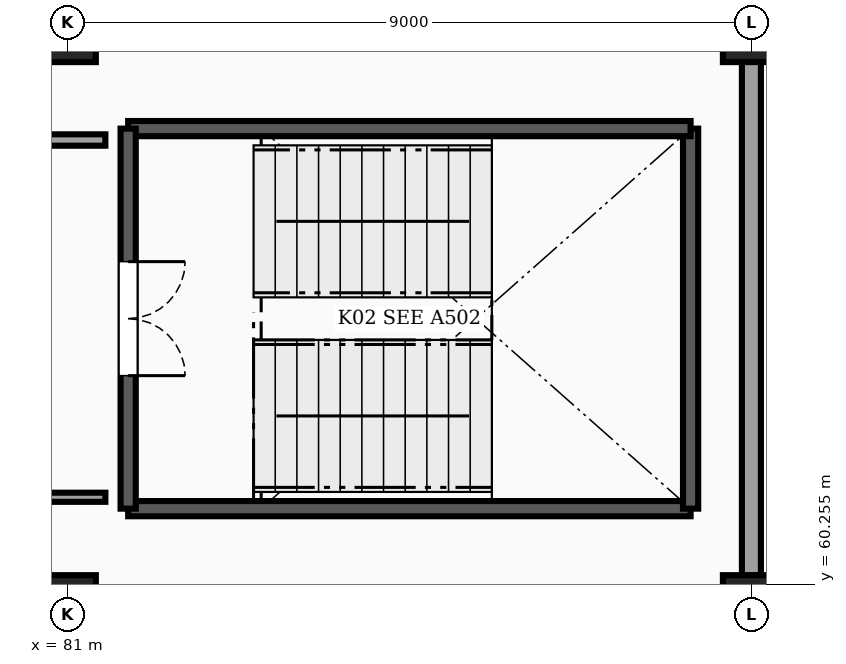
"""IFC4 building model, lengths in metres.
Left out: names, types, materials, properties, quantities, classifications, styles, units other than length and angle.
Written with IfcOpenShell. Run it as: python <this file> out.ifc"""

import sys

from ifc_helpers import new_model, si_unit, direction, frame, frame_2d, origin, origin_2d, place, context, subcontext, project, spatial, rectangle, extrude, element, fill, save


model = new_model("IFC4")
c1 = context("Model", 3, precision=1e-05, world=origin(), true_north=direction((0.0, 1.0)))
c2 = subcontext(c1, "Body", "Model", "MODEL_VIEW")
j1 = project(units=[si_unit("LENGTHUNIT", "METRE"), si_unit("PLANEANGLEUNIT", "RADIAN")], contexts=[c1])
p1 = place(None, origin())
s1 = spatial("IfcSite", under=j1, at=p1, CompositionType="ELEMENT")
p2 = place(p1, origin())
s2 = spatial("IfcBuilding", under=s1, at=p2, CompositionType="ELEMENT")
p3 = place(p2, frame((0.0, 0.0, 4.5)))
s3 = spatial("IfcBuildingStorey", under=s2, at=p3, CompositionType="ELEMENT", Elevation=4.5)
for number, where, z_axis, x_axis in (
    (1, (81.0, 60.0, 0.0), (0.0, 0.0, 1.0), (1.0, 0.0, 0.0)),
    (2, (90.0, 60.0, 0.0), (0.0, 0.0, 1.0), (1.0, 0.0, 0.0)),
    (3, (81.0, 67.5, 0.0), (0.0, 0.0, 1.0), (1.0, 0.0, 0.0)),
    (4, (90.0, 67.5, 0.0), (0.0, 0.0, 1.0), (1.0, 0.0, 0.0)),
):
    element("IfcColumn", number, at=place(p3, frame(where, z_axis=z_axis, x_axis=x_axis)), inside=s3, PredefinedType="COLUMN", context=c2, shape_type="SweptSolid", body=[
        extrude(rectangle(XDim=0.75, YDim=0.75, at=origin_2d()), origin(), (0.0, 0.0, 1.0), 4.0),
    ])
p4 = place(p3, frame((90.0, 67.129, 0.0), z_axis=(0.0, 0.0, 1.0), x_axis=(0.0, -1.0, 0.0)))
e5 = element("IfcWall", 5, at=p4, inside=s3, PredefinedType="SOLIDWALL", context=c2, shape_type="SweptSolid", body=[
    extrude(rectangle(XDim=6.758, YDim=0.25, at=frame_2d((3.379, 0.0))), origin(), (0.0, 0.0, 1.0), 3.147),
])
p5 = place(p3, frame((81.8, 61.25, 0.0), z_axis=(0.0, 0.0, 1.0), x_axis=(1.0, 0.0, 0.0)))
e6 = element("IfcWall", 6, at=p5, inside=s3, PredefinedType="SHEAR", context=c2, shape_type="SweptSolid", body=[
    extrude(rectangle(XDim=7.4, YDim=0.2, at=frame_2d((3.7, 0.0))), origin(), (0.0, 0.0, 1.0), 3.74),
])
p6 = place(p3, frame((89.2, 61.25, 0.0), z_axis=(0.0, 0.0, 1.0), x_axis=(0.0, 1.0, 0.0)))
e7 = element("IfcWall", 7, at=p6, inside=s3, PredefinedType="SHEAR", context=c2, shape_type="SweptSolid", body=[
    extrude(rectangle(XDim=5.0, YDim=0.2, at=frame_2d((2.5, 0.0))), origin(), (0.0, 0.0, 1.0), 3.74),
])
p7 = place(p3, frame((89.2, 66.25, 0.0), z_axis=(0.0, 0.0, 1.0), x_axis=(-1.0, 0.0, 0.0)))
e8 = element("IfcWall", 8, at=p7, inside=s3, PredefinedType="SHEAR", context=c2, shape_type="SweptSolid", body=[
    extrude(rectangle(XDim=7.4, YDim=0.2, at=frame_2d((3.7, 0.0))), origin(), (0.0, 0.0, 1.0), 3.74),
])
p8 = place(p3, frame((81.8, 66.25, 0.0), z_axis=(0.0, 0.0, 1.0), x_axis=(0.0, -1.0, 0.0)))
e9 = element("IfcWall", 9, at=p8, inside=s3, PredefinedType="SHEAR", context=c2, shape_type="SweptSolid", body=[
    extrude(rectangle(XDim=5.0, YDim=0.2, at=frame_2d((2.5, 0.0))), origin(), (0.0, 0.0, 1.0), 3.74),
])
p9 = place(p8, frame((1.75, 0.0, 0.0)))
e10 = element("IfcOpeningElement", 10, at=p9, cuts=e9, PredefinedType="OPENING", context=c2, shape_type="SweptSolid", body=[
    extrude(rectangle(XDim=1.5, YDim=2.15, at=frame_2d((0.75, 1.075))), frame((0.0, 0.11, 0.0), z_axis=(0.0, -1.0, 0.0), x_axis=(1.0, 0.0, 0.0)), (0.0, 0.0, 1.0), 0.22),
])
p10 = place(p3, frame((81.5, 61.4, 0.0), z_axis=(0.0, 0.0, 1.0), x_axis=(-1.0, 0.0, 0.0)))
e11 = element("IfcWall", 11, at=p10, inside=s3, PredefinedType="PARTITIONING", context=c2, shape_type="SweptSolid", body=[
    extrude(rectangle(XDim=3.34, YDim=0.12, at=frame_2d((1.67, 0.0))), origin(), (0.0, 0.0, 1.0), 3.74),
])
p11 = place(p3, frame((78.16, 66.1, 0.0), z_axis=(0.0, 0.0, 1.0), x_axis=(1.0, 0.0, 0.0)))
e12 = element("IfcWall", 12, at=p11, inside=s3, PredefinedType="PARTITIONING", context=c2, shape_type="SweptSolid", body=[
    extrude(rectangle(XDim=3.34, YDim=0.15, at=frame_2d((1.67, 0.0))), origin(), (0.0, 0.0, 1.0), 3.74),
])
p12 = place(p9, origin())
e13 = element("IfcDoor", 13, at=p12, inside=s3, OperationType="DOUBLE_DOOR_SINGLE_SWING", PredefinedType="DOOR", context=c2, shape_type="SweptSolid", body=[
    extrude(rectangle(XDim=1.5, YDim=2.15, at=frame_2d((0.75, 1.075))), frame((0.0, 0.025, 0.0), z_axis=(0.0, -1.0, 0.0), x_axis=(1.0, 0.0, 0.0)), (0.0, 0.0, 1.0), 0.05),
])
fill(e10, e13)
save(model, sys.argv[1])
